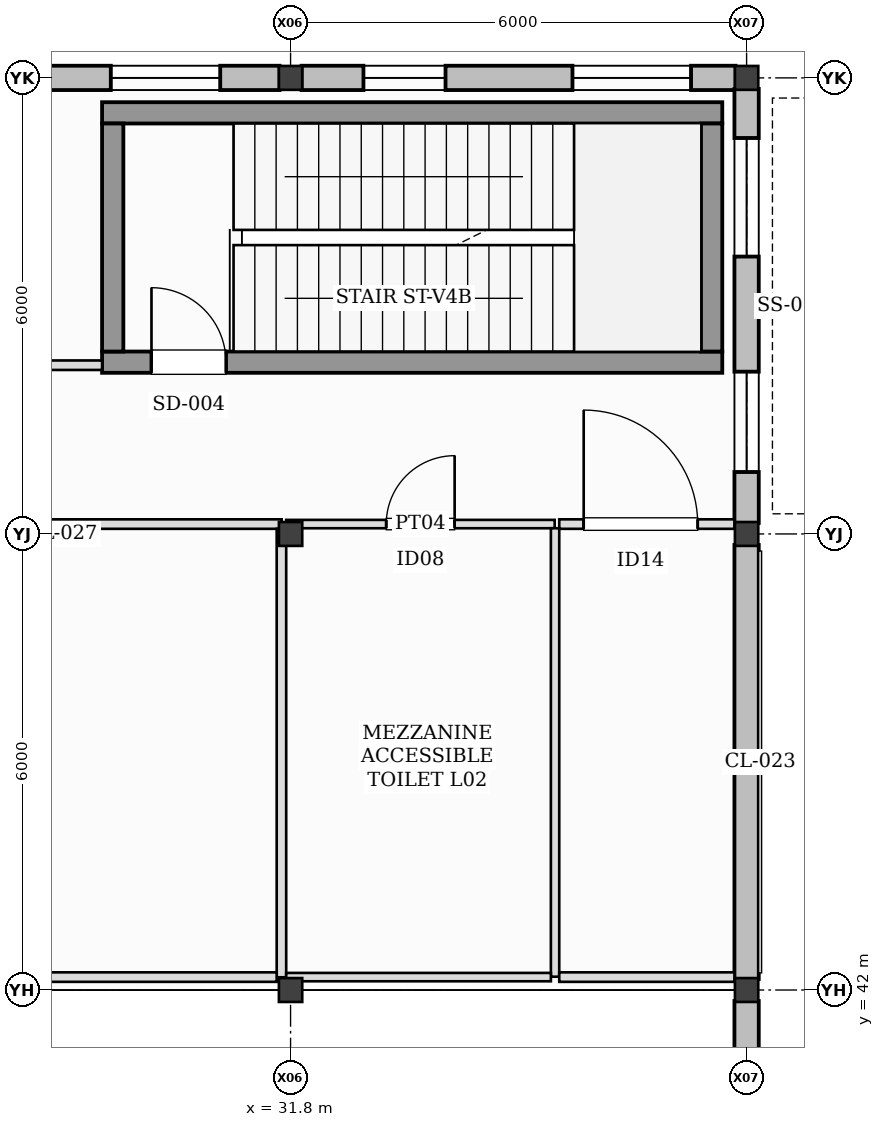
"""IFC4 building model, lengths in metres.
Left out: names, types, materials, properties, quantities, classifications, styles, units other than length and angle.
Written with IfcOpenShell. Run it as: python <this file> out.ifc"""

import sys

from ifc_helpers import new_model, si_unit, direction, frame, frame_2d, origin, origin_2d, place, context, subcontext, project, spatial, rectangle, i_section, extrude, element, fill, save


model = new_model("IFC4")
c1 = context("Model", 3, precision=1e-05, world=origin(), true_north=direction((0.0, 1.0)))
c2 = subcontext(c1, "Body", "Model", "MODEL_VIEW")
j1 = project(units=[si_unit("LENGTHUNIT", "METRE"), si_unit("PLANEANGLEUNIT", "RADIAN")], contexts=[c1])
p1 = place(None, origin())
s1 = spatial("IfcSite", under=j1, at=p1, CompositionType="ELEMENT")
p2 = place(p1, origin())
s2 = spatial("IfcBuilding", under=s1, at=p2, CompositionType="ELEMENT")
p3 = place(p2, frame((0.0, 0.0, 6.0)))
s3 = spatial("IfcBuildingStorey", under=s2, at=p3, CompositionType="ELEMENT", Elevation=6.0)
for number, where, z_axis, x_axis in (
    (1, (31.8, 42.0, 0.0), (0.0, 0.0, 1.0), (1.0, 0.0, 0.0)),
    (2, (31.8, 48.0, 0.0), (0.0, 0.0, 1.0), (1.0, 0.0, 0.0)),
    (3, (31.8, 54.0, 0.0), (0.0, 0.0, 1.0), (1.0, 0.0, 0.0)),
    (4, (37.8, 42.0, 0.0), (0.0, 0.0, 1.0), (1.0, 0.0, 0.0)),
    (5, (37.8, 48.0, 0.0), (0.0, 0.0, 1.0), (1.0, 0.0, 0.0)),
    (6, (37.8, 54.0, 0.0), (0.0, 0.0, 1.0), (1.0, 0.0, 0.0)),
):
    element("IfcColumn", number, at=place(p3, frame(where, z_axis=z_axis, x_axis=x_axis)), inside=s3, PredefinedType="COLUMN", context=c2, shape_type="SweptSolid", body=[
        extrude(i_section(OverallWidth=0.307, OverallDepth=0.314, WebThickness=0.011, FlangeThickness=0.019, at=origin_2d()), origin(), (0.0, 0.0, 1.0), 4.0),
    ])
p4 = place(p3, frame((31.655, 54.0, 0.0), z_axis=(0.0, 0.0, 1.0), x_axis=(-1.0, 0.0, 0.0)))
e7 = element("IfcWall", 7, at=p4, inside=s3, PredefinedType="STANDARD", context=c2, shape_type="SweptSolid", body=[
    extrude(rectangle(XDim=5.71, YDim=0.32, at=frame_2d((2.855, 0.0))), origin(), (0.0, 0.0, 1.0), 4.0),
])
p5 = place(p4, frame((0.78, 0.0, 1.18)))
e8 = element("IfcOpeningElement", 8, at=p5, cuts=e7, PredefinedType="OPENING", context=c2, shape_type="SweptSolid", body=[
    extrude(rectangle(XDim=1.44, YDim=1.44, at=frame_2d((0.72, 0.72))), frame((0.0, 0.17, 0.0), z_axis=(0.0, -1.0, 0.0), x_axis=(1.0, 0.0, 0.0)), (0.0, 0.0, 1.0), 0.34),
])
p6 = place(p4, frame((3.546, 0.0, 0.96)))
e9 = element("IfcOpeningElement", 9, at=p6, cuts=e7, PredefinedType="OPENING", context=c2, shape_type="SweptSolid", body=[
    extrude(rectangle(XDim=0.96, YDim=0.96, at=frame_2d((0.48, 0.48))), frame((0.0, 0.17, 0.0), z_axis=(0.0, -1.0, 0.0), x_axis=(1.0, 0.0, 0.0)), (0.0, 0.0, 1.0), 0.34),
])
p7 = place(p3, frame((37.655, 54.0, 0.0), z_axis=(0.0, 0.0, 1.0), x_axis=(-1.0, 0.0, 0.0)))
e10 = element("IfcWall", 10, at=p7, inside=s3, PredefinedType="STANDARD", context=c2, shape_type="SweptSolid", body=[
    extrude(rectangle(XDim=5.71, YDim=0.32, at=frame_2d((2.855, 0.0))), origin(), (0.0, 0.0, 1.0), 4.0),
])
p8 = place(p7, frame((0.586, 0.0, 1.42)))
e11 = element("IfcOpeningElement", 11, at=p8, cuts=e10, PredefinedType="OPENING", context=c2, shape_type="SweptSolid", body=[
    extrude(rectangle(XDim=1.56, YDim=1.56, at=frame_2d((0.78, 0.78))), frame((0.0, 0.17, 0.0), z_axis=(0.0, -1.0, 0.0), x_axis=(1.0, 0.0, 0.0)), (0.0, 0.0, 1.0), 0.34),
])
p9 = place(p7, frame((3.816, 0.0, 1.28)))
e12 = element("IfcOpeningElement", 12, at=p9, cuts=e10, PredefinedType="OPENING", context=c2, shape_type="SweptSolid", body=[
    extrude(rectangle(XDim=1.08, YDim=1.08, at=frame_2d((0.54, 0.54))), frame((0.0, 0.17, 0.0), z_axis=(0.0, -1.0, 0.0), x_axis=(1.0, 0.0, 0.0)), (0.0, 0.0, 1.0), 0.34),
])
p10 = place(p3, frame((37.8, 36.145, 0.0), z_axis=(0.0, 0.0, 1.0), x_axis=(0.0, 1.0, 0.0)))
e13 = element("IfcWall", 13, at=p10, inside=s3, PredefinedType="STANDARD", context=c2, shape_type="SweptSolid", body=[
    extrude(rectangle(XDim=5.71, YDim=0.32, at=frame_2d((2.855, 0.0))), origin(), (0.0, 0.0, 1.0), 4.0),
])
p11 = place(p10, frame((0.712, 0.0, 1.42)))
e14 = element("IfcOpeningElement", 14, at=p11, cuts=e13, PredefinedType="OPENING", context=c2, shape_type="SweptSolid", body=[
    extrude(rectangle(XDim=1.2, YDim=1.2, at=frame_2d((0.6, 0.6))), frame((0.0, 0.17, 0.0), z_axis=(0.0, -1.0, 0.0), x_axis=(1.0, 0.0, 0.0)), (0.0, 0.0, 1.0), 0.34),
])
p12 = place(p10, frame((3.582, 0.0, 1.28)))
e15 = element("IfcOpeningElement", 15, at=p12, cuts=e13, PredefinedType="OPENING", context=c2, shape_type="SweptSolid", body=[
    extrude(rectangle(XDim=1.44, YDim=1.44, at=frame_2d((0.72, 0.72))), frame((0.0, 0.17, 0.0), z_axis=(0.0, -1.0, 0.0), x_axis=(1.0, 0.0, 0.0)), (0.0, 0.0, 1.0), 0.34),
])
p13 = place(p3, frame((37.8, 42.145, 0.0), z_axis=(0.0, 0.0, 1.0), x_axis=(0.0, 1.0, 0.0)))
e16 = element("IfcWall", 16, at=p13, inside=s3, PredefinedType="STANDARD", context=c2, shape_type="SweptSolid", body=[
    extrude(rectangle(XDim=5.71, YDim=0.32, at=frame_2d((2.855, 0.0))), origin(), (0.0, 0.0, 1.0), 4.0),
])
p14 = place(p3, frame((37.8, 48.145, 0.0), z_axis=(0.0, 0.0, 1.0), x_axis=(0.0, 1.0, 0.0)))
e17 = element("IfcWall", 17, at=p14, inside=s3, PredefinedType="STANDARD", context=c2, shape_type="SweptSolid", body=[
    extrude(rectangle(XDim=5.71, YDim=0.32, at=frame_2d((2.855, 0.0))), origin(), (0.0, 0.0, 1.0), 4.0),
])
p15 = place(p14, frame((0.67, 0.0, 1.28)))
e18 = element("IfcOpeningElement", 18, at=p15, cuts=e17, PredefinedType="OPENING", context=c2, shape_type="SweptSolid", body=[
    extrude(rectangle(XDim=1.32, YDim=1.32, at=frame_2d((0.66, 0.66))), frame((0.0, 0.17, 0.0), z_axis=(0.0, -1.0, 0.0), x_axis=(1.0, 0.0, 0.0)), (0.0, 0.0, 1.0), 0.34),
])
p16 = place(p14, frame((3.504, 0.0, 1.18)))
e19 = element("IfcOpeningElement", 19, at=p16, cuts=e17, PredefinedType="OPENING", context=c2, shape_type="SweptSolid", body=[
    extrude(rectangle(XDim=1.56, YDim=1.56, at=frame_2d((0.78, 0.78))), frame((0.0, 0.17, 0.0), z_axis=(0.0, -1.0, 0.0), x_axis=(1.0, 0.0, 0.0)), (0.0, 0.0, 1.0), 0.34),
])
p17 = place(p3, frame((29.32, 50.26, 0.0), z_axis=(0.0, 0.0, 1.0), x_axis=(1.0, 0.0, 0.0)))
e20 = element("IfcWall", 20, at=p17, inside=s3, PredefinedType="SHEAR", context=c2, shape_type="SweptSolid", body=[
    extrude(rectangle(XDim=8.16, YDim=0.28, at=frame_2d((4.08, 0.0))), origin(), (0.0, 0.0, 1.0), 3.75),
])
p18 = place(p17, frame((0.65, 0.0, 0.0)))
e21 = element("IfcOpeningElement", 21, at=p18, cuts=e20, PredefinedType="OPENING", context=c2, shape_type="SweptSolid", body=[
    extrude(rectangle(XDim=0.98, YDim=2.15, at=frame_2d((0.49, 1.075))), frame((0.0, 0.15, 0.0), z_axis=(0.0, -1.0, 0.0), x_axis=(1.0, 0.0, 0.0)), (0.0, 0.0, 1.0), 0.3),
])
p19 = place(p3, frame((37.48, 53.54, 0.0), z_axis=(0.0, 0.0, 1.0), x_axis=(-1.0, 0.0, 0.0)))
e22 = element("IfcWall", 22, at=p19, inside=s3, PredefinedType="SHEAR", context=c2, shape_type="SweptSolid", body=[
    extrude(rectangle(XDim=8.16, YDim=0.28, at=frame_2d((4.08, 0.0))), origin(), (0.0, 0.0, 1.0), 3.75),
])
for number, where, z_axis, x_axis in (
    (23, (29.46, 53.4, 0.0), (0.0, 0.0, 1.0), (0.0, -1.0, 0.0)),
    (24, (37.34, 50.4, 0.0), (0.0, 0.0, 1.0), (0.0, 1.0, 0.0)),
):
    element("IfcWall", number, at=place(p3, frame(where, z_axis=z_axis, x_axis=x_axis)), inside=s3, PredefinedType="SHEAR", context=c2, shape_type="SweptSolid", body=[
        extrude(rectangle(XDim=3.0, YDim=0.28, at=frame_2d((1.5, 0.0))), origin(), (0.0, 0.0, 1.0), 3.75),
    ])
p20 = place(p3, frame((19.742, 48.13, 0.0), z_axis=(0.0, 0.0, 1.0), x_axis=(1.0, 0.0, 0.0)))
e25 = element("IfcWall", 25, at=p20, inside=s3, PredefinedType="PARTITIONING", context=c2, shape_type="SweptSolid", body=[
    extrude(rectangle(XDim=11.94, YDim=0.125, at=frame_2d((5.97, 0.0))), origin(), (0.0, 0.0, 1.0), 3.72),
])
p21 = place(p20, frame((4.191, 0.0, 0.0)))
e26 = element("IfcOpeningElement", 26, at=p21, cuts=e25, PredefinedType="OPENING", context=c2, shape_type="SweptSolid", body=[
    extrude(rectangle(XDim=0.87, YDim=2.06, at=frame_2d((0.435, 1.03))), frame((0.0, 0.073, 0.0), z_axis=(0.0, -1.0, 0.0), x_axis=(1.0, 0.0, 0.0)), (0.0, 0.0, 1.0), 0.145),
])
p22 = place(p3, frame((31.68, 48.067, 0.0), z_axis=(0.0, 0.0, 1.0), x_axis=(0.0, -1.0, 0.0)))
e27 = element("IfcWall", 27, at=p22, inside=s3, PredefinedType="PARTITIONING", context=c2, shape_type="SweptSolid", body=[
    extrude(rectangle(XDim=5.9, YDim=0.125, at=frame_2d((2.95, 0.0))), origin(), (0.0, 0.0, 1.0), 3.72),
])
p23 = place(p3, frame((31.617, 42.17, 0.0), z_axis=(0.0, 0.0, 1.0), x_axis=(-1.0, 0.0, 0.0)))
e28 = element("IfcWall", 28, at=p23, inside=s3, PredefinedType="PARTITIONING", context=c2, shape_type="SweptSolid", body=[
    extrude(rectangle(XDim=11.875, YDim=0.125, at=frame_2d((5.938, 0.0))), origin(), (0.0, 0.0, 1.0), 3.72),
])
p24 = place(p3, frame((31.742, 48.13, 0.0), z_axis=(0.0, 0.0, 1.0), x_axis=(1.0, 0.0, 0.0)))
e29 = element("IfcWall", 29, at=p24, inside=s3, PredefinedType="PARTITIONING", context=c2, shape_type="SweptSolid", body=[
    extrude(rectangle(XDim=3.532, YDim=0.11, at=frame_2d((1.766, 0.0))), origin(), (0.0, 0.0, 1.0), 3.72),
])
p25 = place(p24, frame((1.316, 0.0, 0.0)))
e30 = element("IfcOpeningElement", 30, at=p25, cuts=e29, PredefinedType="OPENING", context=c2, shape_type="SweptSolid", body=[
    extrude(rectangle(XDim=0.9, YDim=2.1, at=frame_2d((0.45, 1.05))), frame((0.0, 0.065, 0.0), z_axis=(0.0, -1.0, 0.0), x_axis=(1.0, 0.0, 0.0)), (0.0, 0.0, 1.0), 0.13),
])
p26 = place(p3, frame((35.28, 48.075, 0.0), z_axis=(0.0, 0.0, 1.0), x_axis=(0.0, -1.0, 0.0)))
e31 = element("IfcWall", 31, at=p26, inside=s3, PredefinedType="PARTITIONING", context=c2, shape_type="SweptSolid", body=[
    extrude(rectangle(XDim=5.9, YDim=0.11, at=frame_2d((2.95, 0.0))), origin(), (0.0, 0.0, 1.0), 3.72),
])
p27 = place(p3, frame((35.225, 42.17, 0.0), z_axis=(0.0, 0.0, 1.0), x_axis=(-1.0, 0.0, 0.0)))
e32 = element("IfcWall", 32, at=p27, inside=s3, PredefinedType="PARTITIONING", context=c2, shape_type="SweptSolid", body=[
    extrude(rectangle(XDim=3.483, YDim=0.11, at=frame_2d((1.741, 0.0))), origin(), (0.0, 0.0, 1.0), 3.72),
])
p28 = place(p3, frame((35.335, 48.13, 0.0), z_axis=(0.0, 0.0, 1.0), x_axis=(1.0, 0.0, 0.0)))
e33 = element("IfcWall", 33, at=p28, inside=s3, PredefinedType="PARTITIONING", context=c2, shape_type="SweptSolid", body=[
    extrude(rectangle(XDim=2.305, YDim=0.125, at=frame_2d((1.152, 0.0))), origin(), (0.0, 0.0, 1.0), 3.72),
])
p29 = place(p28, frame((0.322, 0.0, 0.0)))
e34 = element("IfcOpeningElement", 34, at=p29, cuts=e33, PredefinedType="OPENING", context=c2, shape_type="SweptSolid", body=[
    extrude(rectangle(XDim=1.5, YDim=2.22, at=frame_2d((0.75, 1.11))), frame((0.0, 0.073, 0.0), z_axis=(0.0, -1.0, 0.0), x_axis=(1.0, 0.0, 0.0)), (0.0, 0.0, 1.0), 0.145),
])
p30 = place(p3, frame((37.64, 42.17, 0.0), z_axis=(0.0, 0.0, 1.0), x_axis=(-1.0, 0.0, 0.0)))
e35 = element("IfcWall", 35, at=p30, inside=s3, PredefinedType="PARTITIONING", context=c2, shape_type="SweptSolid", body=[
    extrude(rectangle(XDim=2.305, YDim=0.125, at=frame_2d((1.152, 0.0))), origin(), (0.0, 0.0, 1.0), 3.72),
])
p31 = place(p3, frame((29.32, 50.22, 0.0), z_axis=(0.0, 0.0, 1.0), x_axis=(-1.0, 0.0, 0.0)))
e36 = element("IfcWall", 36, at=p31, inside=s3, PredefinedType="PARTITIONING", context=c2, shape_type="SweptSolid", body=[
    extrude(rectangle(XDim=19.04, YDim=0.125, at=frame_2d((9.52, 0.0))), origin(), (0.0, 0.0, 1.0), 3.72),
])
p32 = place(p31, frame((8.841, 0.0, 0.0)))
e37 = element("IfcOpeningElement", 37, at=p32, cuts=e36, PredefinedType="OPENING", context=c2, shape_type="SweptSolid", body=[
    extrude(rectangle(XDim=1.58, YDim=2.2, at=frame_2d((0.79, 1.1))), frame((0.0, 0.073, 0.0), z_axis=(0.0, -1.0, 0.0), x_axis=(1.0, 0.0, 0.0)), (0.0, 0.0, 1.0), 0.145),
])
p33 = place(p5, origin())
e38 = element("IfcWindow", 38, at=p33, inside=s3, PartitioningType="SINGLE_PANEL", PredefinedType="WINDOW", context=c2, shape_type="SweptSolid", body=[
    extrude(rectangle(XDim=1.44, YDim=1.44, at=frame_2d((0.72, 0.72))), frame((0.0, 0.03, 0.0), z_axis=(0.0, -1.0, 0.0), x_axis=(1.0, 0.0, 0.0)), (0.0, 0.0, 1.0), 0.06),
])
fill(e8, e38)
p34 = place(p8, origin())
e39 = element("IfcWindow", 39, at=p34, inside=s3, PartitioningType="SINGLE_PANEL", PredefinedType="WINDOW", context=c2, shape_type="SweptSolid", body=[
    extrude(rectangle(XDim=1.56, YDim=1.56, at=frame_2d((0.78, 0.78))), frame((0.0, 0.03, 0.0), z_axis=(0.0, -1.0, 0.0), x_axis=(1.0, 0.0, 0.0)), (0.0, 0.0, 1.0), 0.06),
])
fill(e11, e39)
p35 = place(p9, origin())
e40 = element("IfcWindow", 40, at=p35, inside=s3, PartitioningType="SINGLE_PANEL", PredefinedType="WINDOW", context=c2, shape_type="SweptSolid", body=[
    extrude(rectangle(XDim=1.08, YDim=1.08, at=frame_2d((0.54, 0.54))), frame((0.0, 0.03, 0.0), z_axis=(0.0, -1.0, 0.0), x_axis=(1.0, 0.0, 0.0)), (0.0, 0.0, 1.0), 0.06),
])
fill(e12, e40)
p36 = place(p15, origin())
e41 = element("IfcWindow", 41, at=p36, inside=s3, PartitioningType="SINGLE_PANEL", PredefinedType="WINDOW", context=c2, shape_type="SweptSolid", body=[
    extrude(rectangle(XDim=1.32, YDim=1.32, at=frame_2d((0.66, 0.66))), frame((0.0, 0.03, 0.0), z_axis=(0.0, -1.0, 0.0), x_axis=(1.0, 0.0, 0.0)), (0.0, 0.0, 1.0), 0.06),
])
fill(e18, e41)
p37 = place(p16, origin())
e42 = element("IfcWindow", 42, at=p37, inside=s3, PartitioningType="SINGLE_PANEL", PredefinedType="WINDOW", context=c2, shape_type="SweptSolid", body=[
    extrude(rectangle(XDim=1.56, YDim=1.56, at=frame_2d((0.78, 0.78))), frame((0.0, 0.03, 0.0), z_axis=(0.0, -1.0, 0.0), x_axis=(1.0, 0.0, 0.0)), (0.0, 0.0, 1.0), 0.06),
])
fill(e19, e42)
p38 = place(p18, origin())
e43 = element("IfcDoor", 43, at=p38, inside=s3, OperationType="SINGLE_SWING_LEFT", PredefinedType="DOOR", context=c2, shape_type="SweptSolid", body=[
    extrude(rectangle(XDim=0.98, YDim=2.15, at=frame_2d((0.49, 1.075))), frame((0.0, 0.025, 0.0), z_axis=(0.0, -1.0, 0.0), x_axis=(1.0, 0.0, 0.0)), (0.0, 0.0, 1.0), 0.05),
])
fill(e21, e43)
p39 = place(p25, frame((0.9, 0.0, 0.0), z_axis=(0.0, 0.0, 1.0), x_axis=(-1.0, 0.0, 0.0)))
e44 = element("IfcDoor", 44, at=p39, inside=s3, OperationType="SINGLE_SWING_RIGHT", PredefinedType="DOOR", context=c2, shape_type="SweptSolid", body=[
    extrude(rectangle(XDim=0.9, YDim=2.1, at=frame_2d((0.45, 1.05))), frame((0.0, 0.025, 0.0), z_axis=(0.0, -1.0, 0.0), x_axis=(1.0, 0.0, 0.0)), (0.0, 0.0, 1.0), 0.05),
])
fill(e30, e44)
p40 = place(p29, frame((1.5, 0.0, 0.0), z_axis=(0.0, 0.0, 1.0), x_axis=(-1.0, 0.0, 0.0)))
e45 = element("IfcDoor", 45, at=p40, inside=s3, OperationType="SINGLE_SWING_LEFT", PredefinedType="DOOR", context=c2, shape_type="SweptSolid", body=[
    extrude(rectangle(XDim=1.5, YDim=2.22, at=frame_2d((0.75, 1.11))), frame((0.0, 0.025, 0.0), z_axis=(0.0, -1.0, 0.0), x_axis=(1.0, 0.0, 0.0)), (0.0, 0.0, 1.0), 0.05),
])
fill(e34, e45)
save(model, sys.argv[1])
